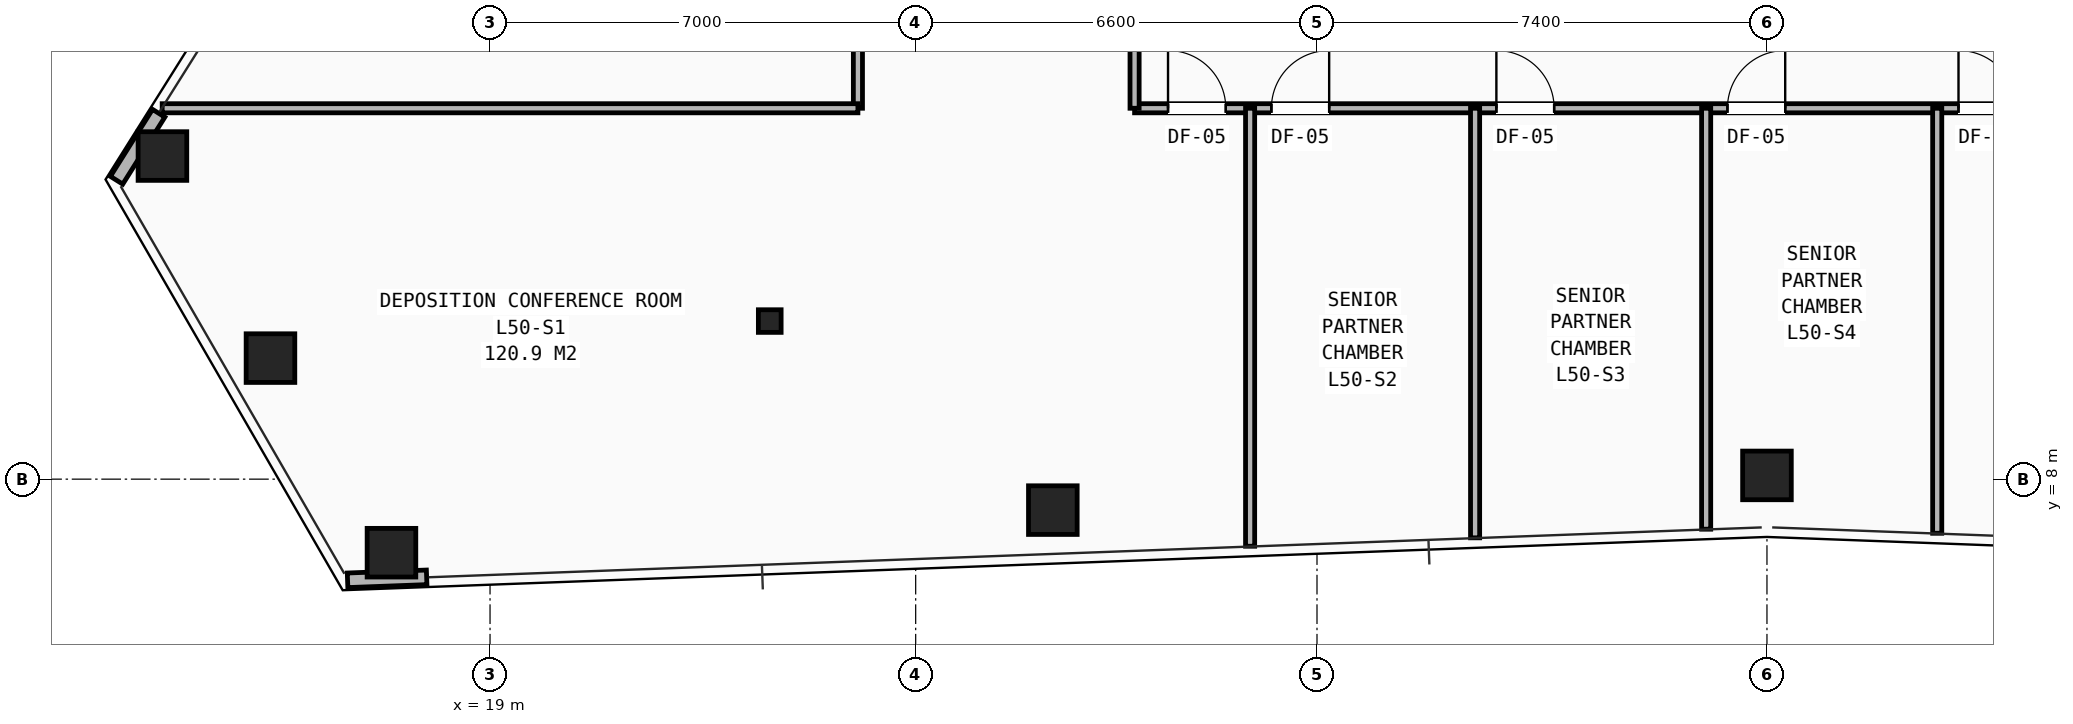
"""IFC4 building model, lengths in metres.
Left out: names, types, materials, properties, quantities, classifications, styles, units other than length and angle.
Written with IfcOpenShell. Run it as: python <this file> out.ifc"""

import sys

from ifc_helpers import new_model, si_unit, direction, frame, frame_2d, origin, origin_2d, place, context, subcontext, project, spatial, rectangle, hollow_rectangle, i_section, extrude, element, fill, save


model = new_model("IFC4")
c1 = context("Model", 3, precision=1e-05, world=origin(), true_north=direction((0.0, 1.0)))
c2 = subcontext(c1, "Body", "Model", "MODEL_VIEW")
j1 = project(units=[si_unit("LENGTHUNIT", "METRE"), si_unit("PLANEANGLEUNIT", "RADIAN")], contexts=[c1])
p1 = place(None, origin())
s1 = spatial("IfcSite", under=j1, at=p1, CompositionType="ELEMENT")
p2 = place(p1, origin())
s2 = spatial("IfcBuilding", under=s1, at=p2, CompositionType="ELEMENT")
p3 = place(p2, frame((0.0, 0.0, 175.8)))
s3 = spatial("IfcBuildingStorey", under=s2, at=p3, CompositionType="ELEMENT", Elevation=175.8)
p4 = place(p3, frame((23.6, 10.6, 0.0), z_axis=(0.0, 0.0, 1.0), x_axis=(1.0, 0.0, 0.0)))
e1 = element("IfcColumn", 1, at=p4, inside=s3, PredefinedType="COLUMN", context=c2, shape_type="SweptSolid", body=[
    extrude(i_section(OverallWidth=0.374, OverallDepth=0.372, WebThickness=0.016, FlangeThickness=0.026, at=origin_2d()), origin(), (0.0, 0.0, 1.0), 3.45),
])
for number, where, z_axis, x_axis in (
    (2, (13.612, 13.314, 0.0), (0.0, 0.0, 1.0), (1.0, 0.0, 0.0)),
    (3, (15.389, 9.991, 0.0), (0.0, 0.0, 1.0), (1.0, 0.0, 0.0)),
    (4, (17.379, 6.791, 0.0), (0.0, 0.0, 1.0), (1.0, 0.0, 0.0)),
    (5, (28.256, 7.491, 0.0), (0.0, 0.0, 1.0), (1.0, 0.0, 0.0)),
    (6, (40.0, 8.061, 0.0), (0.0, 0.0, 1.0), (1.0, 0.0, 0.0)),
):
    element("IfcColumn", number, at=place(p3, frame(where, z_axis=z_axis, x_axis=x_axis)), inside=s3, PredefinedType="COLUMN", context=c2, shape_type="SweptSolid", body=[
        extrude(hollow_rectangle(XDim=0.8, YDim=0.8, WallThickness=0.055, at=origin_2d()), origin(), (0.0, 0.0, 1.0), 3.45),
    ])
for number, where, z_axis, x_axis in (
    (7, (13.551, 14.018, 0.0), (0.0, 0.0, 1.0), (-0.532, -0.847, 0.0)),
    (8, (16.657, 6.336, 0.0), (0.0, 0.0, 1.0), (0.999, 0.037, 0.0)),
):
    element("IfcWall", number, at=place(p3, frame(where, z_axis=z_axis, x_axis=x_axis)), inside=s3, PredefinedType="SHEAR", context=c2, shape_type="SweptSolid", body=[
        extrude(rectangle(XDim=1.302, YDim=0.24, at=frame_2d((0.651, 0.0))), origin(), (0.0, 0.0, 1.0), 2.583),
    ])
p5 = place(p3, frame((29.6, 14.1, 0.0), z_axis=(0.0, 0.0, 1.0), x_axis=(1.0, 0.0, 0.0)))
e9 = element("IfcWall", 9, at=p5, inside=s3, PredefinedType="PARTITIONING", context=c2, shape_type="SweptSolid", body=[
    extrude(rectangle(XDim=18.6, YDim=0.15, at=frame_2d((9.3, 0.0))), origin(), (0.0, 0.0, 1.0), 2.252),
])
p6 = place(p5, frame((0.55, 0.0, 0.0)))
e10 = element("IfcOpeningElement", 10, at=p6, cuts=e9, PredefinedType="OPENING", context=c2, shape_type="SweptSolid", body=[
    extrude(rectangle(XDim=0.95, YDim=2.1, at=frame_2d((0.475, 1.05))), frame((0.0, 0.085, 0.0), z_axis=(0.0, -1.0, 0.0), x_axis=(1.0, 0.0, 0.0)), (0.0, 0.0, 1.0), 0.17),
])
p7 = place(p5, frame((2.25, 0.0, 0.0)))
e11 = element("IfcOpeningElement", 11, at=p7, cuts=e9, PredefinedType="OPENING", context=c2, shape_type="SweptSolid", body=[
    extrude(rectangle(XDim=0.95, YDim=2.1, at=frame_2d((0.475, 1.05))), frame((0.0, 0.085, 0.0), z_axis=(0.0, -1.0, 0.0), x_axis=(1.0, 0.0, 0.0)), (0.0, 0.0, 1.0), 0.17),
])
p8 = place(p5, frame((5.95, 0.0, 0.0)))
e12 = element("IfcOpeningElement", 12, at=p8, cuts=e9, PredefinedType="OPENING", context=c2, shape_type="SweptSolid", body=[
    extrude(rectangle(XDim=0.95, YDim=2.1, at=frame_2d((0.475, 1.05))), frame((0.0, 0.085, 0.0), z_axis=(0.0, -1.0, 0.0), x_axis=(1.0, 0.0, 0.0)), (0.0, 0.0, 1.0), 0.17),
])
p9 = place(p5, frame((9.75, 0.0, 0.0)))
e13 = element("IfcOpeningElement", 13, at=p9, cuts=e9, PredefinedType="OPENING", context=c2, shape_type="SweptSolid", body=[
    extrude(rectangle(XDim=0.95, YDim=2.1, at=frame_2d((0.475, 1.05))), frame((0.0, 0.085, 0.0), z_axis=(0.0, -1.0, 0.0), x_axis=(1.0, 0.0, 0.0)), (0.0, 0.0, 1.0), 0.17),
])
p10 = place(p5, frame((13.55, 0.0, 0.0)))
e14 = element("IfcOpeningElement", 14, at=p10, cuts=e9, PredefinedType="OPENING", context=c2, shape_type="SweptSolid", body=[
    extrude(rectangle(XDim=0.95, YDim=2.1, at=frame_2d((0.475, 1.05))), frame((0.0, 0.085, 0.0), z_axis=(0.0, -1.0, 0.0), x_axis=(1.0, 0.0, 0.0)), (0.0, 0.0, 1.0), 0.17),
])
p11 = place(p5, frame((16.95, 0.0, 0.0)))
e15 = element("IfcOpeningElement", 15, at=p11, cuts=e9, PredefinedType="OPENING", context=c2, shape_type="SweptSolid", body=[
    extrude(rectangle(XDim=0.95, YDim=2.1, at=frame_2d((0.475, 1.05))), frame((0.0, 0.085, 0.0), z_axis=(0.0, -1.0, 0.0), x_axis=(1.0, 0.0, 0.0)), (0.0, 0.0, 1.0), 0.17),
])
p12 = place(p3, frame((29.6, 14.1, 0.0), z_axis=(0.0, 0.0, 1.0), x_axis=(0.0, 1.0, 0.0)))
e16 = element("IfcWall", 16, at=p12, inside=s3, PredefinedType="PARTITIONING", context=c2, shape_type="SweptSolid", body=[
    extrude(rectangle(XDim=8.7, YDim=0.15, at=frame_2d((4.35, 0.0))), origin(), (0.0, 0.0, 1.0), 3.21),
])
p13 = place(p12, frame((2.65, 0.0, 0.0)))
e17 = element("IfcOpeningElement", 17, at=p13, cuts=e16, PredefinedType="OPENING", context=c2, shape_type="SweptSolid", body=[
    extrude(rectangle(XDim=0.85, YDim=2.05, at=frame_2d((0.425, 1.025))), frame((0.0, 0.085, 0.0), z_axis=(0.0, -1.0, 0.0), x_axis=(1.0, 0.0, 0.0)), (0.0, 0.0, 1.0), 0.17),
])
p14 = place(p12, frame((4.75, 0.0, 0.0)))
e18 = element("IfcOpeningElement", 18, at=p14, cuts=e16, PredefinedType="OPENING", context=c2, shape_type="SweptSolid", body=[
    extrude(rectangle(XDim=0.85, YDim=2.05, at=frame_2d((0.425, 1.025))), frame((0.0, 0.085, 0.0), z_axis=(0.0, -1.0, 0.0), x_axis=(1.0, 0.0, 0.0)), (0.0, 0.0, 1.0), 0.17),
])
p15 = place(p12, frame((6.85, 0.0, 0.0)))
e19 = element("IfcOpeningElement", 19, at=p15, cuts=e16, PredefinedType="OPENING", context=c2, shape_type="SweptSolid", body=[
    extrude(rectangle(XDim=0.85, YDim=2.05, at=frame_2d((0.425, 1.025))), frame((0.0, 0.085, 0.0), z_axis=(0.0, -1.0, 0.0), x_axis=(1.0, 0.0, 0.0)), (0.0, 0.0, 1.0), 0.17),
])
p16 = place(p3, frame((25.05, 14.1, 0.0), z_axis=(0.0, 0.0, 1.0), x_axis=(0.0, 1.0, 0.0)))
e20 = element("IfcWall", 20, at=p16, inside=s3, PredefinedType="PARTITIONING", context=c2, shape_type="SweptSolid", body=[
    extrude(rectangle(XDim=8.7, YDim=0.15, at=frame_2d((4.35, 0.0))), origin(), (0.0, 0.0, 1.0), 3.21),
])
p17 = place(p3, frame((31.5, 6.896, 0.0), z_axis=(0.0, 0.0, 1.0), x_axis=(0.0, 1.0, 0.0)))
e21 = element("IfcWall", 21, at=p17, inside=s3, PredefinedType="PARTITIONING", context=c2, shape_type="SweptSolid", body=[
    extrude(rectangle(XDim=7.204, YDim=0.15, at=frame_2d((3.602, 0.0))), origin(), (0.0, 0.0, 1.0), 2.589),
])
p18 = place(p3, frame((35.2, 7.035, 0.0), z_axis=(0.0, 0.0, 1.0), x_axis=(0.0, 1.0, 0.0)))
e22 = element("IfcWall", 22, at=p18, inside=s3, PredefinedType="PARTITIONING", context=c2, shape_type="SweptSolid", body=[
    extrude(rectangle(XDim=7.065, YDim=0.15, at=frame_2d((3.533, 0.0))), origin(), (0.0, 0.0, 1.0), 2.252),
])
p19 = place(p3, frame((39.0, 7.177, 0.0), z_axis=(0.0, 0.0, 1.0), x_axis=(0.0, 1.0, 0.0)))
e23 = element("IfcWall", 23, at=p19, inside=s3, PredefinedType="PARTITIONING", context=c2, shape_type="SweptSolid", body=[
    extrude(rectangle(XDim=6.923, YDim=0.15, at=frame_2d((3.461, 0.0))), origin(), (0.0, 0.0, 1.0), 2.252),
])
p20 = place(p3, frame((42.8, 7.11, 0.0), z_axis=(0.0, 0.0, 1.0), x_axis=(0.0, 1.0, 0.0)))
e24 = element("IfcWall", 24, at=p20, inside=s3, PredefinedType="PARTITIONING", context=c2, shape_type="SweptSolid", body=[
    extrude(rectangle(XDim=6.99, YDim=0.15, at=frame_2d((3.495, 0.0))), origin(), (0.0, 0.0, 1.0), 2.589),
])
p21 = place(p3, frame((13.608, 14.1, 0.0), z_axis=(0.0, 0.0, 1.0), x_axis=(1.0, 0.0, 0.0)))
e25 = element("IfcWall", 25, at=p21, inside=s3, PredefinedType="PARTITIONING", context=c2, shape_type="SweptSolid", body=[
    extrude(rectangle(XDim=11.442, YDim=0.15, at=frame_2d((5.721, 0.0))), origin(), (0.0, 0.0, 1.0), 2.589),
])
p22 = place(p6, origin())
e26 = element("IfcDoor", 26, at=p22, inside=s3, OperationType="SINGLE_SWING_LEFT", PredefinedType="DOOR", context=c2, shape_type="SweptSolid", body=[
    extrude(rectangle(XDim=0.95, YDim=2.1, at=frame_2d((0.475, 1.05))), frame((0.0, 0.025, 0.0), z_axis=(0.0, -1.0, 0.0), x_axis=(1.0, 0.0, 0.0)), (0.0, 0.0, 1.0), 0.05),
])
fill(e10, e26)
p23 = place(p7, origin())
e27 = element("IfcDoor", 27, at=p23, inside=s3, OperationType="SINGLE_SWING_RIGHT", PredefinedType="DOOR", context=c2, shape_type="SweptSolid", body=[
    extrude(rectangle(XDim=0.95, YDim=2.1, at=frame_2d((0.475, 1.05))), frame((0.0, 0.025, 0.0), z_axis=(0.0, -1.0, 0.0), x_axis=(1.0, 0.0, 0.0)), (0.0, 0.0, 1.0), 0.05),
])
fill(e11, e27)
p24 = place(p8, origin())
e28 = element("IfcDoor", 28, at=p24, inside=s3, OperationType="SINGLE_SWING_LEFT", PredefinedType="DOOR", context=c2, shape_type="SweptSolid", body=[
    extrude(rectangle(XDim=0.95, YDim=2.1, at=frame_2d((0.475, 1.05))), frame((0.0, 0.025, 0.0), z_axis=(0.0, -1.0, 0.0), x_axis=(1.0, 0.0, 0.0)), (0.0, 0.0, 1.0), 0.05),
])
fill(e12, e28)
p25 = place(p9, origin())
e29 = element("IfcDoor", 29, at=p25, inside=s3, OperationType="SINGLE_SWING_RIGHT", PredefinedType="DOOR", context=c2, shape_type="SweptSolid", body=[
    extrude(rectangle(XDim=0.95, YDim=2.1, at=frame_2d((0.475, 1.05))), frame((0.0, 0.025, 0.0), z_axis=(0.0, -1.0, 0.0), x_axis=(1.0, 0.0, 0.0)), (0.0, 0.0, 1.0), 0.05),
])
fill(e13, e29)
p26 = place(p10, origin())
e30 = element("IfcDoor", 30, at=p26, inside=s3, OperationType="SINGLE_SWING_LEFT", PredefinedType="DOOR", context=c2, shape_type="SweptSolid", body=[
    extrude(rectangle(XDim=0.95, YDim=2.1, at=frame_2d((0.475, 1.05))), frame((0.0, 0.025, 0.0), z_axis=(0.0, -1.0, 0.0), x_axis=(1.0, 0.0, 0.0)), (0.0, 0.0, 1.0), 0.05),
])
fill(e14, e30)
save(model, sys.argv[1])
